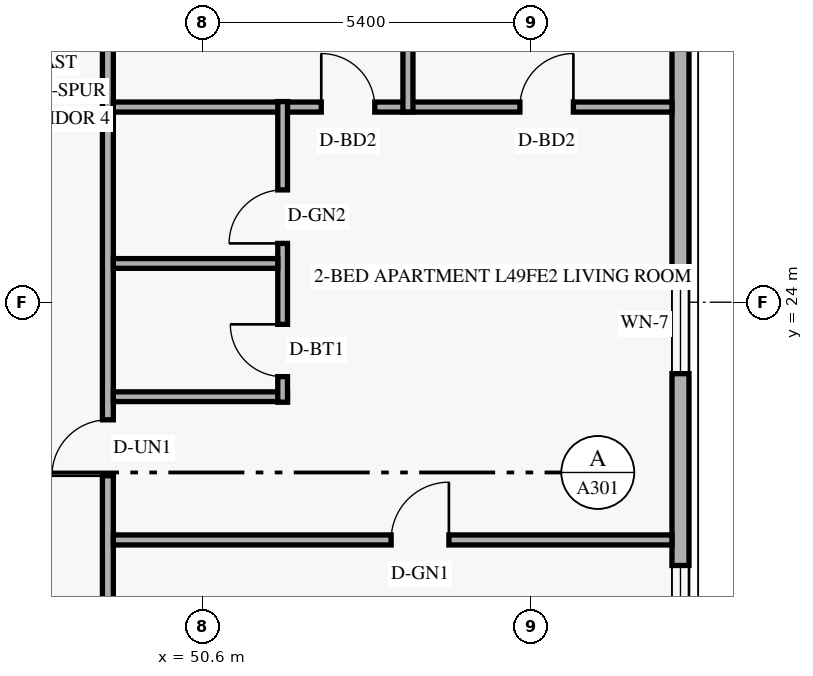
"""IFC4 building model, lengths in metres.
Left out: names, types, materials, properties, quantities, classifications, styles, units other than length and angle.
Written with IfcOpenShell. Run it as: python <this file> out.ifc"""

import sys

from ifc_helpers import new_model, si_unit, direction, frame, frame_2d, origin, place, context, subcontext, project, spatial, rectangle, extrude, element, fill, save


model = new_model("IFC4")
c1 = context("Model", 3, precision=1e-05, world=origin(), true_north=direction((0.0, 1.0)))
c2 = subcontext(c1, "Body", "Model", "MODEL_VIEW")
j1 = project(units=[si_unit("LENGTHUNIT", "METRE"), si_unit("PLANEANGLEUNIT", "RADIAN")], contexts=[c1])
p1 = place(None, origin())
s1 = spatial("IfcSite", under=j1, at=p1, CompositionType="ELEMENT")
p2 = place(p1, origin())
s2 = spatial("IfcBuilding", under=s1, at=p2, CompositionType="ELEMENT")
p3 = place(p2, frame((0.0, 0.0, 188.4)))
s3 = spatial("IfcBuildingStorey", under=s2, at=p3, CompositionType="ELEMENT", Elevation=188.4)
p4 = place(p3, frame((58.46, 7.62, 0.0), z_axis=(0.0, 0.0, 1.0), x_axis=(0.0, 1.0, 0.0)))
e1 = element("IfcWall", 1, at=p4, inside=s3, PredefinedType="SOLIDWALL", context=c2, shape_type="SweptSolid", body=[
    extrude(rectangle(XDim=32.76, YDim=0.28, at=frame_2d((16.38, 0.0))), origin(), (0.0, 0.0, 1.0), 3.35),
])
p5 = place(p4, frame((2.92, 0.0, 0.85)))
e2 = element("IfcOpeningElement", 2, at=p5, cuts=e1, PredefinedType="OPENING", context=c2, shape_type="SweptSolid", body=[
    extrude(rectangle(XDim=1.65, YDim=1.6, at=frame_2d((0.825, 0.8))), frame((0.0, 0.15, 0.0), z_axis=(0.0, -1.0, 0.0), x_axis=(1.0, 0.0, 0.0)), (0.0, 0.0, 1.0), 0.3),
])
p6 = place(p4, frame((7.91, 0.0, 0.85)))
e3 = element("IfcOpeningElement", 3, at=p6, cuts=e1, PredefinedType="OPENING", context=c2, shape_type="SweptSolid", body=[
    extrude(rectangle(XDim=1.65, YDim=1.6, at=frame_2d((0.825, 0.8))), frame((0.0, 0.15, 0.0), z_axis=(0.0, -1.0, 0.0), x_axis=(1.0, 0.0, 0.0)), (0.0, 0.0, 1.0), 0.3),
])
p7 = place(p4, frame((10.4, 0.0, 0.85)))
e4 = element("IfcOpeningElement", 4, at=p7, cuts=e1, PredefinedType="OPENING", context=c2, shape_type="SweptSolid", body=[
    extrude(rectangle(XDim=1.65, YDim=1.6, at=frame_2d((0.825, 0.8))), frame((0.0, 0.15, 0.0), z_axis=(0.0, -1.0, 0.0), x_axis=(1.0, 0.0, 0.0)), (0.0, 0.0, 1.0), 0.3),
])
p8 = place(p4, frame((15.205, 0.0, 0.85)))
e5 = element("IfcOpeningElement", 5, at=p8, cuts=e1, PredefinedType="OPENING", context=c2, shape_type="SweptSolid", body=[
    extrude(rectangle(XDim=1.65, YDim=1.6, at=frame_2d((0.825, 0.8))), frame((0.0, 0.15, 0.0), z_axis=(0.0, -1.0, 0.0), x_axis=(1.0, 0.0, 0.0)), (0.0, 0.0, 1.0), 0.3),
])
p9 = place(p4, frame((20.76, 0.0, 0.85)))
e6 = element("IfcOpeningElement", 6, at=p9, cuts=e1, PredefinedType="OPENING", context=c2, shape_type="SweptSolid", body=[
    extrude(rectangle(XDim=1.65, YDim=1.6, at=frame_2d((0.825, 0.8))), frame((0.0, 0.15, 0.0), z_axis=(0.0, -1.0, 0.0), x_axis=(1.0, 0.0, 0.0)), (0.0, 0.0, 1.0), 0.3),
])
p10 = place(p4, frame((24.0, 0.0, 0.85)))
e7 = element("IfcOpeningElement", 7, at=p10, cuts=e1, PredefinedType="OPENING", context=c2, shape_type="SweptSolid", body=[
    extrude(rectangle(XDim=1.65, YDim=1.6, at=frame_2d((0.825, 0.8))), frame((0.0, 0.15, 0.0), z_axis=(0.0, -1.0, 0.0), x_axis=(1.0, 0.0, 0.0)), (0.0, 0.0, 1.0), 0.3),
])
p11 = place(p4, frame((28.59, 0.0, 0.85)))
e8 = element("IfcOpeningElement", 8, at=p11, cuts=e1, PredefinedType="OPENING", context=c2, shape_type="SweptSolid", body=[
    extrude(rectangle(XDim=1.65, YDim=1.6, at=frame_2d((0.825, 0.8))), frame((0.0, 0.15, 0.0), z_axis=(0.0, -1.0, 0.0), x_axis=(1.0, 0.0, 0.0)), (0.0, 0.0, 1.0), 0.3),
])
p12 = place(p3, frame((49.043, 4.28, 0.0), z_axis=(0.0, 0.0, 1.0), x_axis=(0.0, 1.0, 0.0)))
e9 = element("IfcWall", 9, at=p12, inside=s3, PredefinedType="STANDARD", context=c2, shape_type="SweptSolid", body=[
    extrude(rectangle(XDim=39.44, YDim=0.18, at=frame_2d((19.72, 0.0))), origin(), (0.0, 0.0, 1.0), 2.72),
])
p13 = place(p12, frame((8.605, 0.0, 0.0)))
e10 = element("IfcOpeningElement", 10, at=p13, cuts=e9, PredefinedType="OPENING", context=c2, shape_type="SweptSolid", body=[
    extrude(rectangle(XDim=0.92, YDim=2.15, at=frame_2d((0.46, 1.075))), frame((0.0, 0.1, 0.0), z_axis=(0.0, -1.0, 0.0), x_axis=(1.0, 0.0, 0.0)), (0.0, 0.0, 1.0), 0.2),
])
p14 = place(p12, frame((16.866, 0.0, 0.0)))
e11 = element("IfcOpeningElement", 11, at=p14, cuts=e9, PredefinedType="OPENING", context=c2, shape_type="SweptSolid", body=[
    extrude(rectangle(XDim=0.92, YDim=2.15, at=frame_2d((0.46, 1.075))), frame((0.0, 0.1, 0.0), z_axis=(0.0, -1.0, 0.0), x_axis=(1.0, 0.0, 0.0)), (0.0, 0.0, 1.0), 0.2),
])
p15 = place(p12, frame((29.98, 0.0, 0.0)))
e12 = element("IfcOpeningElement", 12, at=p15, cuts=e9, PredefinedType="OPENING", context=c2, shape_type="SweptSolid", body=[
    extrude(rectangle(XDim=0.92, YDim=2.15, at=frame_2d((0.46, 1.075))), frame((0.0, 0.1, 0.0), z_axis=(0.0, -1.0, 0.0), x_axis=(1.0, 0.0, 0.0)), (0.0, 0.0, 1.0), 0.2),
])
p16 = place(p3, frame((49.133, 27.21, 0.0), z_axis=(0.0, 0.0, 1.0), x_axis=(1.0, 0.0, 0.0)))
e13 = element("IfcWall", 13, at=p16, inside=s3, PredefinedType="PARTITIONING", context=c2, shape_type="SweptSolid", body=[
    extrude(rectangle(XDim=9.187, YDim=0.165, at=frame_2d((4.594, 0.0))), origin(), (0.0, 0.0, 1.0), 2.869),
])
p17 = place(p16, frame((3.419, 0.0, 0.0)))
e14 = element("IfcOpeningElement", 14, at=p17, cuts=e13, PredefinedType="OPENING", context=c2, shape_type="SweptSolid", body=[
    extrude(rectangle(XDim=0.88, YDim=2.14, at=frame_2d((0.44, 1.07))), frame((0.0, 0.093, 0.0), z_axis=(0.0, -1.0, 0.0), x_axis=(1.0, 0.0, 0.0)), (0.0, 0.0, 1.0), 0.185),
])
p18 = place(p16, frame((6.686, 0.0, 0.0)))
e15 = element("IfcOpeningElement", 15, at=p18, cuts=e13, PredefinedType="OPENING", context=c2, shape_type="SweptSolid", body=[
    extrude(rectangle(XDim=0.88, YDim=2.14, at=frame_2d((0.44, 1.07))), frame((0.0, 0.093, 0.0), z_axis=(0.0, -1.0, 0.0), x_axis=(1.0, 0.0, 0.0)), (0.0, 0.0, 1.0), 0.185),
])
p19 = place(p3, frame((49.133, 22.446, 0.0), z_axis=(0.0, 0.0, 1.0), x_axis=(1.0, 0.0, 0.0)))
e16 = element("IfcWall", 16, at=p19, inside=s3, PredefinedType="PLUMBINGWALL", context=c2, shape_type="SweptSolid", body=[
    extrude(rectangle(XDim=2.864, YDim=0.16, at=frame_2d((1.432, 0.0))), origin(), (0.0, 0.0, 1.0), 3.35),
])
p20 = place(p3, frame((51.917, 22.356, 0.0), z_axis=(0.0, 0.0, 1.0), x_axis=(0.0, 1.0, 0.0)))
e17 = element("IfcWall", 17, at=p20, inside=s3, PredefinedType="PLUMBINGWALL", context=c2, shape_type="SweptSolid", body=[
    extrude(rectangle(XDim=4.944, YDim=0.16, at=frame_2d((2.472, 0.0))), origin(), (0.0, 0.0, 1.0), 3.35),
])
p21 = place(p20, frame((0.42, 0.0, 0.0)))
e18 = element("IfcOpeningElement", 18, at=p21, cuts=e17, PredefinedType="OPENING", context=c2, shape_type="SweptSolid", body=[
    extrude(rectangle(XDim=0.86, YDim=2.12, at=frame_2d((0.43, 1.06))), frame((0.0, 0.09, 0.0), z_axis=(0.0, -1.0, 0.0), x_axis=(1.0, 0.0, 0.0)), (0.0, 0.0, 1.0), 0.18),
])
p22 = place(p20, frame((2.611, 0.0, 0.0)))
e19 = element("IfcOpeningElement", 19, at=p22, cuts=e17, PredefinedType="OPENING", context=c2, shape_type="SweptSolid", body=[
    extrude(rectangle(XDim=0.88, YDim=2.12, at=frame_2d((0.44, 1.06))), frame((0.0, 0.09, 0.0), z_axis=(0.0, -1.0, 0.0), x_axis=(1.0, 0.0, 0.0)), (0.0, 0.0, 1.0), 0.18),
])
p23 = place(p3, frame((49.133, 24.637, 0.0), z_axis=(0.0, 0.0, 1.0), x_axis=(1.0, 0.0, 0.0)))
e20 = element("IfcWall", 20, at=p23, inside=s3, PredefinedType="PLUMBINGWALL", context=c2, shape_type="SweptSolid", body=[
    extrude(rectangle(XDim=2.704, YDim=0.16, at=frame_2d((1.352, 0.0))), origin(), (0.0, 0.0, 1.0), 3.35),
])
p24 = place(p3, frame((49.133, 20.09, 0.0), z_axis=(0.0, 0.0, 1.0), x_axis=(1.0, 0.0, 0.0)))
e21 = element("IfcWall", 21, at=p24, inside=s3, PredefinedType="PARTITIONING", context=c2, shape_type="SweptSolid", body=[
    extrude(rectangle(XDim=9.187, YDim=0.165, at=frame_2d((4.594, 0.0))), origin(), (0.0, 0.0, 1.0), 2.869),
])
p25 = place(p24, frame((4.569, 0.0, 0.0)))
e22 = element("IfcOpeningElement", 22, at=p25, cuts=e21, PredefinedType="OPENING", context=c2, shape_type="SweptSolid", body=[
    extrude(rectangle(XDim=0.95, YDim=2.15, at=frame_2d((0.475, 1.075))), frame((0.0, 0.093, 0.0), z_axis=(0.0, -1.0, 0.0), x_axis=(1.0, 0.0, 0.0)), (0.0, 0.0, 1.0), 0.185),
])
p26 = place(p3, frame((53.978, 27.13, 0.0), z_axis=(0.0, 0.0, 1.0), x_axis=(0.0, 1.0, 0.0)))
e23 = element("IfcWall", 23, at=p26, inside=s3, PredefinedType="PARTITIONING", context=c2, shape_type="SweptSolid", body=[
    extrude(rectangle(XDim=4.46, YDim=0.165, at=frame_2d((2.23, 0.0))), origin(), (0.0, 0.0, 1.0), 3.35),
])
p27 = place(p7, origin())
e24 = element("IfcWindow", 24, at=p27, inside=s3, PartitioningType="SINGLE_PANEL", PredefinedType="WINDOW", context=c2, shape_type="SweptSolid", body=[
    extrude(rectangle(XDim=1.65, YDim=1.6, at=frame_2d((0.825, 0.8))), frame((0.0, 0.03, 0.0), z_axis=(0.0, -1.0, 0.0), x_axis=(1.0, 0.0, 0.0)), (0.0, 0.0, 1.0), 0.06),
])
fill(e4, e24)
p28 = place(p8, origin())
e25 = element("IfcWindow", 25, at=p28, inside=s3, PartitioningType="SINGLE_PANEL", PredefinedType="WINDOW", context=c2, shape_type="SweptSolid", body=[
    extrude(rectangle(XDim=1.65, YDim=1.6, at=frame_2d((0.825, 0.8))), frame((0.0, 0.03, 0.0), z_axis=(0.0, -1.0, 0.0), x_axis=(1.0, 0.0, 0.0)), (0.0, 0.0, 1.0), 0.06),
])
fill(e5, e25)
p29 = place(p25, origin())
e26 = element("IfcDoor", 26, at=p29, inside=s3, OperationType="SINGLE_SWING_RIGHT", PredefinedType="DOOR", context=c2, shape_type="SweptSolid", body=[
    extrude(rectangle(XDim=0.95, YDim=2.15, at=frame_2d((0.475, 1.075))), frame((0.0, 0.025, 0.0), z_axis=(0.0, -1.0, 0.0), x_axis=(1.0, 0.0, 0.0)), (0.0, 0.0, 1.0), 0.05),
])
fill(e22, e26)
p30 = place(p14, origin())
e27 = element("IfcDoor", 27, at=p30, inside=s3, OperationType="SINGLE_SWING_LEFT", PredefinedType="DOOR", context=c2, shape_type="SweptSolid", body=[
    extrude(rectangle(XDim=0.92, YDim=2.15, at=frame_2d((0.46, 1.075))), frame((0.0, 0.025, 0.0), z_axis=(0.0, -1.0, 0.0), x_axis=(1.0, 0.0, 0.0)), (0.0, 0.0, 1.0), 0.05),
])
fill(e11, e27)
p31 = place(p21, origin())
e28 = element("IfcDoor", 28, at=p31, inside=s3, OperationType="SINGLE_SWING_RIGHT", PredefinedType="DOOR", context=c2, shape_type="SweptSolid", body=[
    extrude(rectangle(XDim=0.86, YDim=2.12, at=frame_2d((0.43, 1.06))), frame((0.0, 0.025, 0.0), z_axis=(0.0, -1.0, 0.0), x_axis=(1.0, 0.0, 0.0)), (0.0, 0.0, 1.0), 0.05),
])
fill(e18, e28)
p32 = place(p22, origin())
e29 = element("IfcDoor", 29, at=p32, inside=s3, OperationType="SINGLE_SWING_LEFT", PredefinedType="DOOR", context=c2, shape_type="SweptSolid", body=[
    extrude(rectangle(XDim=0.88, YDim=2.12, at=frame_2d((0.44, 1.06))), frame((0.0, 0.025, 0.0), z_axis=(0.0, -1.0, 0.0), x_axis=(1.0, 0.0, 0.0)), (0.0, 0.0, 1.0), 0.05),
])
fill(e19, e29)
p33 = place(p17, origin())
e30 = element("IfcDoor", 30, at=p33, inside=s3, OperationType="SINGLE_SWING_LEFT", PredefinedType="DOOR", context=c2, shape_type="SweptSolid", body=[
    extrude(rectangle(XDim=0.88, YDim=2.14, at=frame_2d((0.44, 1.07))), frame((0.0, 0.025, 0.0), z_axis=(0.0, -1.0, 0.0), x_axis=(1.0, 0.0, 0.0)), (0.0, 0.0, 1.0), 0.05),
])
fill(e14, e30)
p34 = place(p18, origin())
e31 = element("IfcDoor", 31, at=p34, inside=s3, OperationType="SINGLE_SWING_RIGHT", PredefinedType="DOOR", context=c2, shape_type="SweptSolid", body=[
    extrude(rectangle(XDim=0.88, YDim=2.14, at=frame_2d((0.44, 1.07))), frame((0.0, 0.025, 0.0), z_axis=(0.0, -1.0, 0.0), x_axis=(1.0, 0.0, 0.0)), (0.0, 0.0, 1.0), 0.05),
])
fill(e15, e31)
save(model, sys.argv[1])
